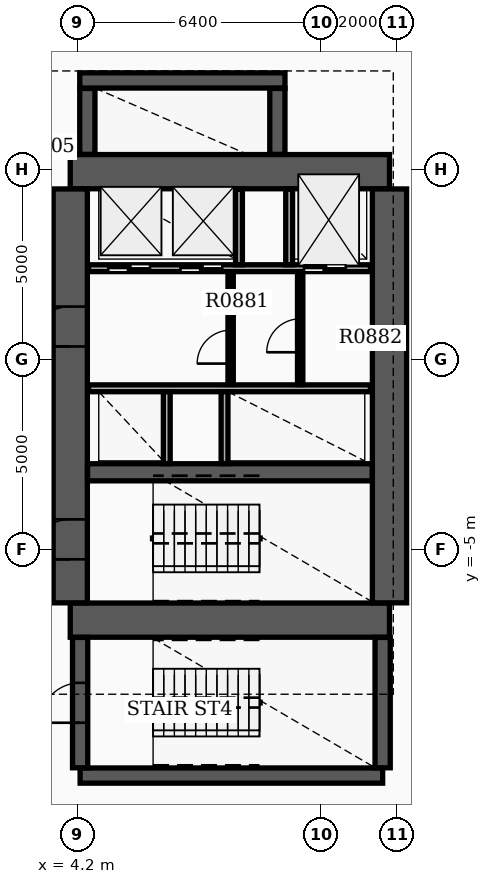
"""IFC4 building model, lengths in metres.
Left out: names, types, materials, properties, quantities, classifications, styles, units other than length and angle.
Written with IfcOpenShell. Run it as: python <this file> out.ifc"""

import sys

from ifc_helpers import new_model, si_unit, direction, frame, frame_2d, origin, place, context, subcontext, project, spatial, rectangle, extrude, element, fill, save


model = new_model("IFC4")
c1 = context("Model", 3, precision=1e-05, world=origin(), true_north=direction((0.0, 1.0)))
c2 = subcontext(c1, "Body", "Model", "MODEL_VIEW")
j1 = project(units=[si_unit("LENGTHUNIT", "METRE"), si_unit("PLANEANGLEUNIT", "RADIAN")], contexts=[c1])
p1 = place(None, origin())
s1 = spatial("IfcSite", under=j1, at=p1, CompositionType="ELEMENT")
p2 = place(p1, origin())
s2 = spatial("IfcBuilding", under=s1, at=p2, CompositionType="ELEMENT")
p3 = place(p2, frame((0.0, 0.0, 60.0)))
s3 = spatial("IfcBuildingStorey", under=s2, at=p3, CompositionType="ELEMENT", Elevation=60.0)
for number, where, z_axis, x_axis in (
    (1, (4.0, -6.85, 0.0), (0.0, 0.0, 1.0), (1.0, 0.0, 0.0)),
    (2, (4.0, 4.95, 0.0), (0.0, 0.0, 1.0), (1.0, 0.0, 0.0)),
):
    element("IfcWall", number, at=place(p3, frame(where, z_axis=z_axis, x_axis=x_axis)), inside=s3, PredefinedType="SHEAR", context=c2, shape_type="SweptSolid", body=[
        extrude(rectangle(XDim=8.4, YDim=0.9, at=frame_2d((4.2, 0.0))), origin(), (0.0, 0.0, 1.0), 3.7),
    ])
p4 = place(p3, frame((4.0, -6.395, 0.0), z_axis=(0.0, 0.0, 1.0), x_axis=(0.0, 1.0, 0.0)))
e3 = element("IfcWall", 3, at=p4, inside=s3, PredefinedType="SHEAR", context=c2, shape_type="SweptSolid", body=[
    extrude(rectangle(XDim=10.89, YDim=0.9, at=frame_2d((5.445, 0.0))), origin(), (0.0, 0.0, 1.0), 3.7),
])
p5 = place(p4, frame((1.145, 0.0, 0.0)))
e4 = element("IfcOpeningElement", 4, at=p5, cuts=e3, PredefinedType="OPENING", context=c2, shape_type="SweptSolid", body=[
    extrude(rectangle(XDim=1.05, YDim=2.15, at=frame_2d((0.525, 1.075))), frame((0.0, 0.46, 0.0), z_axis=(0.0, -1.0, 0.0), x_axis=(1.0, 0.0, 0.0)), (0.0, 0.0, 1.0), 0.92),
])
p6 = place(p4, frame((6.745, 0.0, 0.0)))
e5 = element("IfcOpeningElement", 5, at=p6, cuts=e3, PredefinedType="OPENING", context=c2, shape_type="SweptSolid", body=[
    extrude(rectangle(XDim=1.05, YDim=2.15, at=frame_2d((0.525, 1.075))), frame((0.0, 0.46, 0.0), z_axis=(0.0, -1.0, 0.0), x_axis=(1.0, 0.0, 0.0)), (0.0, 0.0, 1.0), 0.92),
])
p7 = place(p3, frame((12.4, -6.395, 0.0), z_axis=(0.0, 0.0, 1.0), x_axis=(0.0, 1.0, 0.0)))
e6 = element("IfcWall", 6, at=p7, inside=s3, PredefinedType="SHEAR", context=c2, shape_type="SweptSolid", body=[
    extrude(rectangle(XDim=10.89, YDim=0.9, at=frame_2d((5.445, 0.0))), origin(), (0.0, 0.0, 1.0), 3.7),
])
p8 = place(p3, frame((4.455, -2.96, 0.0), z_axis=(0.0, 0.0, 1.0), x_axis=(1.0, 0.0, 0.0)))
e7 = element("IfcWall", 7, at=p8, inside=s3, PredefinedType="SHEAR", context=c2, shape_type="SweptSolid", body=[
    extrude(rectangle(XDim=7.49, YDim=0.45, at=frame_2d((3.745, 0.0))), origin(), (0.0, 0.0, 1.0), 3.7),
])
p9 = place(p3, frame((4.26, -10.94, 0.0), z_axis=(0.0, 0.0, 1.0), x_axis=(1.0, 0.0, 0.0)))
e8 = element("IfcWall", 8, at=p9, inside=s3, PredefinedType="SHEAR", context=c2, shape_type="SweptSolid", body=[
    extrude(rectangle(XDim=7.96, YDim=0.4, at=frame_2d((3.98, 0.0))), origin(), (0.0, 0.0, 1.0), 3.7),
])
p10 = place(p3, frame((4.26, -10.735, 0.0), z_axis=(0.0, 0.0, 1.0), x_axis=(0.0, 1.0, 0.0)))
e9 = element("IfcWall", 9, at=p10, inside=s3, PredefinedType="SHEAR", context=c2, shape_type="SweptSolid", body=[
    extrude(rectangle(XDim=3.43, YDim=0.4, at=frame_2d((1.715, 0.0))), origin(), (0.0, 0.0, 1.0), 3.7),
])
p11 = place(p10, frame((1.185, 0.0, 0.0)))
e10 = element("IfcOpeningElement", 10, at=p11, cuts=e9, PredefinedType="OPENING", context=c2, shape_type="SweptSolid", body=[
    extrude(rectangle(XDim=1.05, YDim=2.15, at=frame_2d((0.525, 1.075))), frame((0.0, 0.21, 0.0), z_axis=(0.0, -1.0, 0.0), x_axis=(1.0, 0.0, 0.0)), (0.0, 0.0, 1.0), 0.42),
])
p12 = place(p3, frame((12.22, -10.735, 0.0), z_axis=(0.0, 0.0, 1.0), x_axis=(0.0, 1.0, 0.0)))
e11 = element("IfcWall", 11, at=p12, inside=s3, PredefinedType="SHEAR", context=c2, shape_type="SweptSolid", body=[
    extrude(rectangle(XDim=3.43, YDim=0.4, at=frame_2d((1.715, 0.0))), origin(), (0.0, 0.0, 1.0), 3.7),
])
p13 = place(p3, frame((4.45, 5.405, 0.0), z_axis=(0.0, 0.0, 1.0), x_axis=(0.0, 1.0, 0.0)))
e12 = element("IfcWall", 12, at=p13, inside=s3, PredefinedType="SHEAR", context=c2, shape_type="SweptSolid", body=[
    extrude(rectangle(XDim=1.735, YDim=0.4, at=frame_2d((0.867, 0.0))), origin(), (0.0, 0.0, 1.0), 3.7),
])
p14 = place(p3, frame((4.25, 7.35, 0.0), z_axis=(0.0, 0.0, 1.0), x_axis=(1.0, 0.0, 0.0)))
e13 = element("IfcWall", 13, at=p14, inside=s3, PredefinedType="SHEAR", context=c2, shape_type="SweptSolid", body=[
    extrude(rectangle(XDim=5.4, YDim=0.4, at=frame_2d((2.7, 0.0))), origin(), (0.0, 0.0, 1.0), 3.7),
])
p15 = place(p3, frame((9.45, 5.405, 0.0), z_axis=(0.0, 0.0, 1.0), x_axis=(0.0, 1.0, 0.0)))
e14 = element("IfcWall", 14, at=p15, inside=s3, PredefinedType="SHEAR", context=c2, shape_type="SweptSolid", body=[
    extrude(rectangle(XDim=1.735, YDim=0.4, at=frame_2d((0.867, 0.0))), origin(), (0.0, 0.0, 1.0), 3.7),
])
p16 = place(p3, frame((4.48, 2.41, 0.0), z_axis=(0.0, 0.0, 1.0), x_axis=(1.0, 0.0, 0.0)))
e15 = element("IfcWall", 15, at=p16, inside=s3, PredefinedType="SOLIDWALL", context=c2, shape_type="SweptSolid", body=[
    extrude(rectangle(XDim=7.42, YDim=0.18, at=frame_2d((3.71, 0.0))), origin(), (0.0, 0.0, 1.0), 2.9),
])
p17 = place(p16, frame((5.67, 0.0, 0.0)))
e16 = element("IfcOpeningElement", 16, at=p17, cuts=e15, PredefinedType="OPENING", context=c2, shape_type="SweptSolid", body=[
    extrude(rectangle(XDim=1.1, YDim=2.15, at=frame_2d((0.55, 1.075))), frame((0.0, 0.1, 0.0), z_axis=(0.0, -1.0, 0.0), x_axis=(1.0, 0.0, 0.0)), (0.0, 0.0, 1.0), 0.2),
])
p18 = place(p16, frame((0.52, 0.0, 0.0)))
e17 = element("IfcOpeningElement", 17, at=p18, cuts=e15, PredefinedType="OPENING", context=c2, shape_type="SweptSolid", body=[
    extrude(rectangle(XDim=1.1, YDim=2.15, at=frame_2d((0.55, 1.075))), frame((0.0, 0.1, 0.0), z_axis=(0.0, -1.0, 0.0), x_axis=(1.0, 0.0, 0.0)), (0.0, 0.0, 1.0), 0.2),
])
p19 = place(p16, frame((2.42, 0.0, 0.0)))
e18 = element("IfcOpeningElement", 18, at=p19, cuts=e15, PredefinedType="OPENING", context=c2, shape_type="SweptSolid", body=[
    extrude(rectangle(XDim=1.1, YDim=2.15, at=frame_2d((0.55, 1.075))), frame((0.0, 0.1, 0.0), z_axis=(0.0, -1.0, 0.0), x_axis=(1.0, 0.0, 0.0)), (0.0, 0.0, 1.0), 0.2),
])
p20 = place(p3, frame((4.48, -0.75, 0.0), z_axis=(0.0, 0.0, 1.0), x_axis=(1.0, 0.0, 0.0)))
e19 = element("IfcWall", 19, at=p20, inside=s3, PredefinedType="SOLIDWALL", context=c2, shape_type="SweptSolid", body=[
    extrude(rectangle(XDim=7.42, YDim=0.18, at=frame_2d((3.71, 0.0))), origin(), (0.0, 0.0, 1.0), 2.9),
])
for number, where, z_axis, x_axis in (
    (20, (8.44, 2.5, 0.0), (0.0, 0.0, 1.0), (0.0, 1.0, 0.0)),
    (21, (9.76, 2.5, 0.0), (0.0, 0.0, 1.0), (0.0, 1.0, 0.0)),
):
    element("IfcWall", number, at=place(p3, frame(where, z_axis=z_axis, x_axis=x_axis)), inside=s3, PredefinedType="SOLIDWALL", context=c2, shape_type="SweptSolid", body=[
        extrude(rectangle(XDim=1.99, YDim=0.18, at=frame_2d((0.995, 0.0))), origin(), (0.0, 0.0, 1.0), 2.9),
    ])
for number, where, z_axis, x_axis in (
    (22, (6.54, -2.73, 0.0), (0.0, 0.0, 1.0), (0.0, 1.0, 0.0)),
    (23, (8.06, -2.73, 0.0), (0.0, 0.0, 1.0), (0.0, 1.0, 0.0)),
):
    element("IfcWall", number, at=place(p3, frame(where, z_axis=z_axis, x_axis=x_axis)), inside=s3, PredefinedType="SOLIDWALL", context=c2, shape_type="SweptSolid", body=[
        extrude(rectangle(XDim=1.89, YDim=0.18, at=frame_2d((0.945, 0.0))), origin(), (0.0, 0.0, 1.0), 2.9),
    ])
p21 = place(p3, frame((8.22, -0.65, 0.0), z_axis=(0.0, 0.0, 1.0), x_axis=(0.0, 1.0, 0.0)))
e24 = element("IfcWall", 24, at=p21, inside=s3, PredefinedType="SOLIDWALL", context=c2, shape_type="SweptSolid", body=[
    extrude(rectangle(XDim=2.96, YDim=0.14, at=frame_2d((1.48, 0.0))), origin(), (0.0, 0.0, 1.0), 2.9),
])
p22 = place(p21, frame((0.55, 0.0, 0.0)))
e25 = element("IfcOpeningElement", 25, at=p22, cuts=e24, PredefinedType="OPENING", context=c2, shape_type="SweptSolid", body=[
    extrude(rectangle(XDim=0.88, YDim=2.1, at=frame_2d((0.44, 1.05))), frame((0.0, 0.08, 0.0), z_axis=(0.0, -1.0, 0.0), x_axis=(1.0, 0.0, 0.0)), (0.0, 0.0, 1.0), 0.16),
])
p23 = place(p3, frame((10.05, -0.652, 0.0), z_axis=(0.0, 0.0, 1.0), x_axis=(0.0, 1.0, 0.0)))
e26 = element("IfcWall", 26, at=p23, inside=s3, PredefinedType="PARTITIONING", context=c2, shape_type="SweptSolid", body=[
    extrude(rectangle(XDim=2.962, YDim=0.14, at=frame_2d((1.481, 0.0))), origin(), (0.0, 0.0, 1.0), 2.9),
])
p24 = place(p23, frame((0.85, 0.0, 0.0)))
e27 = element("IfcOpeningElement", 27, at=p24, cuts=e26, PredefinedType="OPENING", context=c2, shape_type="SweptSolid", body=[
    extrude(rectangle(XDim=0.88, YDim=2.1, at=frame_2d((0.44, 1.05))), frame((0.0, 0.08, 0.0), z_axis=(0.0, -1.0, 0.0), x_axis=(1.0, 0.0, 0.0)), (0.0, 0.0, 1.0), 0.16),
])
p25 = place(p5, origin())
e28 = element("IfcDoor", 28, at=p25, inside=s3, OperationType="SINGLE_SWING_LEFT", PredefinedType="DOOR", context=c2, shape_type="SweptSolid", body=[
    extrude(rectangle(XDim=1.05, YDim=2.15, at=frame_2d((0.525, 1.075))), frame((0.0, 0.025, 0.0), z_axis=(0.0, -1.0, 0.0), x_axis=(1.0, 0.0, 0.0)), (0.0, 0.0, 1.0), 0.05),
])
fill(e4, e28)
p26 = place(p6, origin())
e29 = element("IfcDoor", 29, at=p26, inside=s3, OperationType="SINGLE_SWING_LEFT", PredefinedType="DOOR", context=c2, shape_type="SweptSolid", body=[
    extrude(rectangle(XDim=1.05, YDim=2.15, at=frame_2d((0.525, 1.075))), frame((0.0, 0.025, 0.0), z_axis=(0.0, -1.0, 0.0), x_axis=(1.0, 0.0, 0.0)), (0.0, 0.0, 1.0), 0.05),
])
fill(e5, e29)
p27 = place(p11, origin())
e30 = element("IfcDoor", 30, at=p27, inside=s3, OperationType="SINGLE_SWING_LEFT", PredefinedType="DOOR", context=c2, shape_type="SweptSolid", body=[
    extrude(rectangle(XDim=1.05, YDim=2.15, at=frame_2d((0.525, 1.075))), frame((0.0, 0.025, 0.0), z_axis=(0.0, -1.0, 0.0), x_axis=(1.0, 0.0, 0.0)), (0.0, 0.0, 1.0), 0.05),
])
fill(e10, e30)
p28 = place(p17, origin())
e31 = element("IfcDoor", 31, at=p28, inside=s3, OperationType="DOUBLE_DOOR_SLIDING", PredefinedType="DOOR", context=c2, shape_type="SweptSolid", body=[
    extrude(rectangle(XDim=1.1, YDim=2.15, at=frame_2d((0.55, 1.075))), frame((0.0, 0.025, 0.0), z_axis=(0.0, -1.0, 0.0), x_axis=(1.0, 0.0, 0.0)), (0.0, 0.0, 1.0), 0.05),
])
fill(e16, e31)
p29 = place(p18, origin())
e32 = element("IfcDoor", 32, at=p29, inside=s3, OperationType="DOUBLE_DOOR_SLIDING", PredefinedType="DOOR", context=c2, shape_type="SweptSolid", body=[
    extrude(rectangle(XDim=1.1, YDim=2.15, at=frame_2d((0.55, 1.075))), frame((0.0, 0.025, 0.0), z_axis=(0.0, -1.0, 0.0), x_axis=(1.0, 0.0, 0.0)), (0.0, 0.0, 1.0), 0.05),
])
fill(e17, e32)
p30 = place(p19, origin())
e33 = element("IfcDoor", 33, at=p30, inside=s3, OperationType="DOUBLE_DOOR_SLIDING", PredefinedType="DOOR", context=c2, shape_type="SweptSolid", body=[
    extrude(rectangle(XDim=1.1, YDim=2.15, at=frame_2d((0.55, 1.075))), frame((0.0, 0.025, 0.0), z_axis=(0.0, -1.0, 0.0), x_axis=(1.0, 0.0, 0.0)), (0.0, 0.0, 1.0), 0.05),
])
fill(e18, e33)
p31 = place(p22, origin())
e34 = element("IfcDoor", 34, at=p31, inside=s3, OperationType="SINGLE_SWING_LEFT", PredefinedType="DOOR", context=c2, shape_type="SweptSolid", body=[
    extrude(rectangle(XDim=0.88, YDim=2.1, at=frame_2d((0.44, 1.05))), frame((0.0, 0.025, 0.0), z_axis=(0.0, -1.0, 0.0), x_axis=(1.0, 0.0, 0.0)), (0.0, 0.0, 1.0), 0.05),
])
fill(e25, e34)
p32 = place(p24, origin())
e35 = element("IfcDoor", 35, at=p32, inside=s3, OperationType="SINGLE_SWING_LEFT", PredefinedType="DOOR", context=c2, shape_type="SweptSolid", body=[
    extrude(rectangle(XDim=0.88, YDim=2.1, at=frame_2d((0.44, 1.05))), frame((0.0, 0.025, 0.0), z_axis=(0.0, -1.0, 0.0), x_axis=(1.0, 0.0, 0.0)), (0.0, 0.0, 1.0), 0.05),
])
fill(e27, e35)
save(model, sys.argv[1])
